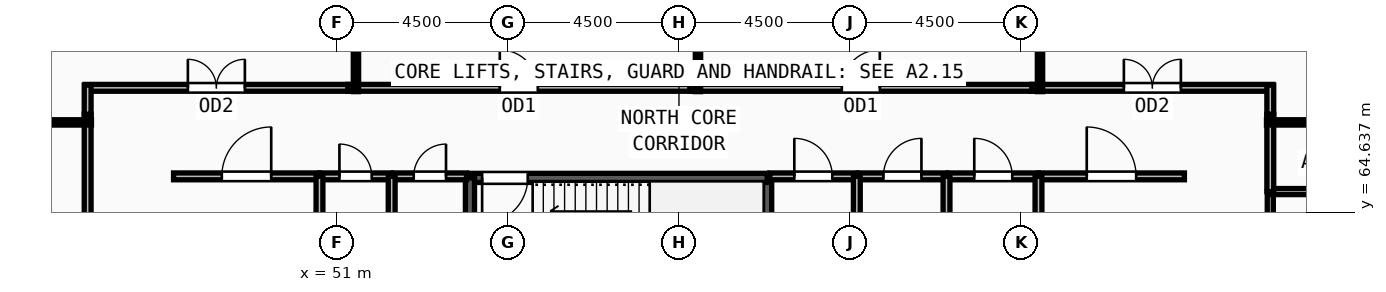
"""IFC4 building model, lengths in metres.
Left out: names, types, materials, properties, quantities, classifications, styles, units other than length and angle.
Written with IfcOpenShell. Run it as: python <this file> out.ifc"""

import sys

from ifc_helpers import new_model, si_unit, direction, frame, frame_2d, origin, place, context, subcontext, project, spatial, rectangle, extrude, source, transform, mapped, element, fill, save


model = new_model("IFC4")
c1 = context("Model", 3, precision=1e-05, world=origin(), true_north=direction((0.0, 1.0)))
c2 = subcontext(c1, "Body", "Model", "MODEL_VIEW")
j1 = project(units=[si_unit("LENGTHUNIT", "METRE"), si_unit("PLANEANGLEUNIT", "RADIAN")], contexts=[c1])
p1 = place(None, origin())
s1 = spatial("IfcSite", under=j1, at=p1, CompositionType="ELEMENT")
p2 = place(p1, origin())
s2 = spatial("IfcBuilding", under=s1, at=p2, CompositionType="ELEMENT")
p3 = place(p2, frame((0.0, 0.0, 124.5)))
s3 = spatial("IfcBuildingStorey", under=s2, at=p3, CompositionType="ELEMENT", Elevation=124.5)
p4 = place(p3, frame((62.32, 62.1, 0.0), z_axis=(0.0, 0.0, 1.0), x_axis=(0.0, 1.0, 0.0)))
e1 = element("IfcWall", 1, at=p4, inside=s3, PredefinedType="SOLIDWALL", context=c2, shape_type="SweptSolid", body=[
    extrude(rectangle(XDim=3.44, YDim=0.24, at=frame_2d((1.72, 0.0))), origin(), (0.0, 0.0, 1.0), 3.57),
])
p5 = place(p3, frame((62.32, 65.54, 0.0), z_axis=(0.0, 0.0, 1.0), x_axis=(-1.0, 0.0, 0.0)))
e2 = element("IfcWall", 2, at=p5, inside=s3, PredefinedType="SOLIDWALL", context=c2, shape_type="SweptSolid", body=[
    extrude(rectangle(XDim=7.82, YDim=0.24, at=frame_2d((3.91, 0.0))), origin(), (0.0, 0.0, 1.0), 3.57),
])
m1 = source(origin(), c2, "Body", "SweptSolid", [
    extrude(rectangle(XDim=1.2, YDim=2.2, at=frame_2d((0.6, 1.1))), frame((0.0, 0.13, 0.0), z_axis=(0.0, -1.0, 0.0), x_axis=(1.0, 0.0, 0.0)), (0.0, 0.0, 1.0), 0.26),
])
p6 = place(p5, frame((6.3, 0.0, 0.0)))
e3 = element("IfcOpeningElement", 3, at=p6, cuts=e2, PredefinedType="OPENING", context=c2, shape_type="MappedRepresentation", body=[
    mapped(m1, transform((0.0, 0.0, 0.0), x_axis=(1.0, 0.0, 0.0), y_axis=(0.0, 1.0, 0.0), z_axis=(0.0, 0.0, 1.0), scale=1.0)),
])
p7 = place(p3, frame((54.5, 65.54, 0.0), z_axis=(0.0, 0.0, 1.0), x_axis=(0.0, -1.0, 0.0)))
e4 = element("IfcWall", 4, at=p7, inside=s3, PredefinedType="SOLIDWALL", context=c2, shape_type="SweptSolid", body=[
    extrude(rectangle(XDim=3.44, YDim=0.24, at=frame_2d((1.72, 0.0))), origin(), (0.0, 0.0, 1.0), 3.57),
])
p8 = place(p3, frame((75.56, 62.44, 0.0), z_axis=(0.0, 0.0, 1.0), x_axis=(0.0, 1.0, 0.0)))
e5 = element("IfcWall", 5, at=p8, inside=s3, PredefinedType="PARTITIONING", context=c2, shape_type="SweptSolid", body=[
    extrude(rectangle(XDim=2.74, YDim=0.16, at=frame_2d((1.37, 0.0))), origin(), (0.0, 0.0, 1.0), 3.57),
])
m2 = source(origin(), c2, "Body", "SweptSolid", [
    extrude(rectangle(XDim=1.05, YDim=2.15, at=frame_2d((0.525, 1.075))), frame((0.0, 0.09, 0.0), z_axis=(0.0, -1.0, 0.0), x_axis=(1.0, 0.0, 0.0)), (0.0, 0.0, 1.0), 0.18),
])
p9 = place(p8, frame((0.845, 0.0, 0.0)))
e6 = element("IfcOpeningElement", 6, at=p9, cuts=e5, PredefinedType="OPENING", context=c2, shape_type="MappedRepresentation", body=[
    mapped(m2, transform((0.0, 0.0, 0.0), x_axis=(1.0, 0.0, 0.0), y_axis=(0.0, 1.0, 0.0), z_axis=(0.0, 0.0, 1.0), scale=1.0)),
])
p10 = place(p3, frame((50.54, 65.58, 0.0), z_axis=(0.0, 0.0, 1.0), x_axis=(1.0, 0.0, 0.0)))
e7 = element("IfcWall", 7, at=p10, inside=s3, PredefinedType="PARTITIONING", context=c2, shape_type="SweptSolid", body=[
    extrude(rectangle(XDim=1.9, YDim=0.18, at=frame_2d((0.95, 0.0))), origin(), (0.0, 0.0, 1.0), 3.57),
])
m3 = source(origin(), c2, "Body", "SweptSolid", [
    extrude(rectangle(XDim=0.85, YDim=2.1, at=frame_2d((0.425, 1.05))), frame((0.0, 0.1, 0.0), z_axis=(0.0, -1.0, 0.0), x_axis=(1.0, 0.0, 0.0)), (0.0, 0.0, 1.0), 0.2),
])
p11 = place(p10, frame((0.525, 0.0, 0.0)))
e8 = element("IfcOpeningElement", 8, at=p11, cuts=e7, PredefinedType="OPENING", context=c2, shape_type="MappedRepresentation", body=[
    mapped(m3, transform((0.0, 0.0, 0.0), x_axis=(1.0, 0.0, 0.0), y_axis=(0.0, 1.0, 0.0), z_axis=(0.0, 0.0, 1.0), scale=1.0)),
])
p12 = place(p3, frame((52.48, 65.58, 0.0), z_axis=(0.0, 0.0, 1.0), x_axis=(1.0, 0.0, 0.0)))
e9 = element("IfcWall", 9, at=p12, inside=s3, PredefinedType="PARTITIONING", context=c2, shape_type="SweptSolid", body=[
    extrude(rectangle(XDim=1.93, YDim=0.18, at=frame_2d((0.965, 0.0))), origin(), (0.0, 0.0, 1.0), 3.57),
])
p13 = place(p12, frame((0.54, 0.0, 0.0)))
e10 = element("IfcOpeningElement", 10, at=p13, cuts=e9, PredefinedType="OPENING", context=c2, shape_type="MappedRepresentation", body=[
    mapped(m3, transform((0.0, 0.0, 0.0), x_axis=(1.0, 0.0, 0.0), y_axis=(0.0, 1.0, 0.0), z_axis=(0.0, 0.0, 1.0), scale=1.0)),
])
p14 = place(p3, frame((62.39, 65.58, 0.0), z_axis=(0.0, 0.0, 1.0), x_axis=(1.0, 0.0, 0.0)))
e11 = element("IfcWall", 11, at=p14, inside=s3, PredefinedType="PARTITIONING", context=c2, shape_type="SweptSolid", body=[
    extrude(rectangle(XDim=2.29, YDim=0.18, at=frame_2d((1.145, 0.0))), origin(), (0.0, 0.0, 1.0), 3.57),
])
m4 = source(origin(), c2, "Body", "SweptSolid", [
    extrude(rectangle(XDim=1.0, YDim=2.2, at=frame_2d((0.5, 1.1))), frame((0.0, 0.1, 0.0), z_axis=(0.0, -1.0, 0.0), x_axis=(1.0, 0.0, 0.0)), (0.0, 0.0, 1.0), 0.2),
])
p15 = place(p14, frame((0.645, 0.0, 0.0)))
e12 = element("IfcOpeningElement", 12, at=p15, cuts=e11, PredefinedType="OPENING", context=c2, shape_type="MappedRepresentation", body=[
    mapped(m4, transform((0.0, 0.0, 0.0), x_axis=(1.0, 0.0, 0.0), y_axis=(0.0, 1.0, 0.0), z_axis=(0.0, 0.0, 1.0), scale=1.0)),
])
p16 = place(p3, frame((64.72, 65.58, 0.0), z_axis=(0.0, 0.0, 1.0), x_axis=(1.0, 0.0, 0.0)))
e13 = element("IfcWall", 13, at=p16, inside=s3, PredefinedType="PARTITIONING", context=c2, shape_type="SweptSolid", body=[
    extrude(rectangle(XDim=2.32, YDim=0.18, at=frame_2d((1.16, 0.0))), origin(), (0.0, 0.0, 1.0), 3.57),
])
p17 = place(p16, frame((0.66, 0.0, 0.0)))
e14 = element("IfcOpeningElement", 14, at=p17, cuts=e13, PredefinedType="OPENING", context=c2, shape_type="MappedRepresentation", body=[
    mapped(m4, transform((0.0, 0.0, 0.0), x_axis=(1.0, 0.0, 0.0), y_axis=(0.0, 1.0, 0.0), z_axis=(0.0, 0.0, 1.0), scale=1.0)),
])
p18 = place(p3, frame((67.08, 65.58, 0.0), z_axis=(0.0, 0.0, 1.0), x_axis=(1.0, 0.0, 0.0)))
e15 = element("IfcWall", 15, at=p18, inside=s3, PredefinedType="PARTITIONING", context=c2, shape_type="SweptSolid", body=[
    extrude(rectangle(XDim=2.38, YDim=0.18, at=frame_2d((1.19, 0.0))), origin(), (0.0, 0.0, 1.0), 3.57),
])
p19 = place(p18, frame((0.69, 0.0, 0.0)))
e16 = element("IfcOpeningElement", 16, at=p19, cuts=e15, PredefinedType="OPENING", context=c2, shape_type="MappedRepresentation", body=[
    mapped(m4, transform((0.0, 0.0, 0.0), x_axis=(1.0, 0.0, 0.0), y_axis=(0.0, 1.0, 0.0), z_axis=(0.0, 0.0, 1.0), scale=1.0)),
])
p20 = place(p3, frame((46.7, 65.58, 0.0), z_axis=(0.0, 0.0, 1.0), x_axis=(1.0, 0.0, 0.0)))
e17 = element("IfcWall", 17, at=p20, inside=s3, PredefinedType="PARTITIONING", context=c2, shape_type="SweptSolid", body=[
    extrude(rectangle(XDim=3.84, YDim=0.18, at=frame_2d((1.92, 0.0))), origin(), (0.0, 0.0, 1.0), 3.57),
])
m5 = source(origin(), c2, "Body", "SweptSolid", [
    extrude(rectangle(XDim=1.3, YDim=2.2, at=frame_2d((0.65, 1.1))), frame((0.0, 0.1, 0.0), z_axis=(0.0, -1.0, 0.0), x_axis=(1.0, 0.0, 0.0)), (0.0, 0.0, 1.0), 0.2),
])
p21 = place(p20, frame((1.27, 0.0, 0.0)))
e18 = element("IfcOpeningElement", 18, at=p21, cuts=e17, PredefinedType="OPENING", context=c2, shape_type="MappedRepresentation", body=[
    mapped(m5, transform((0.0, 0.0, 0.0), x_axis=(1.0, 0.0, 0.0), y_axis=(0.0, 1.0, 0.0), z_axis=(0.0, 0.0, 1.0), scale=1.0)),
])
p22 = place(p3, frame((69.46, 65.58, 0.0), z_axis=(0.0, 0.0, 1.0), x_axis=(1.0, 0.0, 0.0)))
e19 = element("IfcWall", 19, at=p22, inside=s3, PredefinedType="PARTITIONING", context=c2, shape_type="SweptSolid", body=[
    extrude(rectangle(XDim=3.84, YDim=0.18, at=frame_2d((1.92, 0.0))), origin(), (0.0, 0.0, 1.0), 3.57),
])
p23 = place(p22, frame((1.27, 0.0, 0.0)))
e20 = element("IfcOpeningElement", 20, at=p23, cuts=e19, PredefinedType="OPENING", context=c2, shape_type="MappedRepresentation", body=[
    mapped(m5, transform((0.0, 0.0, 0.0), x_axis=(1.0, 0.0, 0.0), y_axis=(0.0, 1.0, 0.0), z_axis=(0.0, 0.0, 1.0), scale=1.0)),
])
p24 = place(p3, frame((69.285, 67.91, 0.0), z_axis=(0.0, 0.0, 1.0), x_axis=(1.0, 0.0, 0.0)))
e21 = element("IfcWall", 21, at=p24, inside=s3, PredefinedType="PARTITIONING", context=c2, shape_type="SweptSolid", body=[
    extrude(rectangle(XDim=6.345, YDim=0.18, at=frame_2d((3.172, 0.0))), origin(), (0.0, 0.0, 1.0), 3.57),
])
m6 = source(origin(), c2, "Body", "SweptSolid", [
    extrude(rectangle(XDim=1.5, YDim=2.2, at=frame_2d((0.75, 1.1))), frame((0.0, 0.1, 0.0), z_axis=(0.0, -1.0, 0.0), x_axis=(1.0, 0.0, 0.0)), (0.0, 0.0, 1.0), 0.2),
])
p25 = place(p24, frame((2.422, 0.0, 0.0)))
e22 = element("IfcOpeningElement", 22, at=p25, cuts=e21, PredefinedType="OPENING", context=c2, shape_type="MappedRepresentation", body=[
    mapped(m6, transform((0.0, 0.0, 0.0), x_axis=(1.0, 0.0, 0.0), y_axis=(0.0, 1.0, 0.0), z_axis=(0.0, 0.0, 1.0), scale=1.0)),
])
p26 = place(p3, frame((60.285, 67.91, 0.0), z_axis=(0.0, 0.0, 1.0), x_axis=(1.0, 0.0, 0.0)))
e23 = element("IfcWall", 23, at=p26, inside=s3, PredefinedType="PARTITIONING", context=c2, shape_type="SweptSolid", body=[
    extrude(rectangle(XDim=9.0, YDim=0.18, at=frame_2d((4.5, 0.0))), origin(), (0.0, 0.0, 1.0), 3.57),
])
p27 = place(p26, frame((4.0, 0.0, 0.0)))
e24 = element("IfcOpeningElement", 24, at=p27, cuts=e23, PredefinedType="OPENING", context=c2, shape_type="MappedRepresentation", body=[
    mapped(m4, transform((0.0, 0.0, 0.0), x_axis=(1.0, 0.0, 0.0), y_axis=(0.0, 1.0, 0.0), z_axis=(0.0, 0.0, 1.0), scale=1.0)),
])
p28 = place(p3, frame((51.285, 67.91, 0.0), z_axis=(0.0, 0.0, 1.0), x_axis=(1.0, 0.0, 0.0)))
e25 = element("IfcWall", 25, at=p28, inside=s3, PredefinedType="PARTITIONING", context=c2, shape_type="SweptSolid", body=[
    extrude(rectangle(XDim=9.0, YDim=0.18, at=frame_2d((4.5, 0.0))), origin(), (0.0, 0.0, 1.0), 3.57),
])
p29 = place(p28, frame((4.0, 0.0, 0.0)))
e26 = element("IfcOpeningElement", 26, at=p29, cuts=e25, PredefinedType="OPENING", context=c2, shape_type="MappedRepresentation", body=[
    mapped(m4, transform((0.0, 0.0, 0.0), x_axis=(1.0, 0.0, 0.0), y_axis=(0.0, 1.0, 0.0), z_axis=(0.0, 0.0, 1.0), scale=1.0)),
])
p30 = place(p3, frame((44.37, 67.91, 0.0), z_axis=(0.0, 0.0, 1.0), x_axis=(1.0, 0.0, 0.0)))
e27 = element("IfcWall", 27, at=p30, inside=s3, PredefinedType="PARTITIONING", context=c2, shape_type="SweptSolid", body=[
    extrude(rectangle(XDim=6.915, YDim=0.18, at=frame_2d((3.458, 0.0))), origin(), (0.0, 0.0, 1.0), 3.57),
])
p31 = place(p30, frame((2.707, 0.0, 0.0)))
e28 = element("IfcOpeningElement", 28, at=p31, cuts=e27, PredefinedType="OPENING", context=c2, shape_type="MappedRepresentation", body=[
    mapped(m6, transform((0.0, 0.0, 0.0), x_axis=(1.0, 0.0, 0.0), y_axis=(0.0, 1.0, 0.0), z_axis=(0.0, 0.0, 1.0), scale=1.0)),
])
p32 = place(p3, frame((44.44, 58.285, 0.0), z_axis=(0.0, 0.0, 1.0), x_axis=(0.0, 1.0, 0.0)))
e29 = element("IfcWall", 29, at=p32, inside=s3, PredefinedType="PARTITIONING", context=c2, shape_type="SweptSolid", body=[
    extrude(rectangle(XDim=8.93, YDim=0.18, at=frame_2d((4.465, 0.0))), origin(), (0.0, 0.0, 1.0), 3.57),
])
p33 = place(p32, frame((3.715, 0.0, 0.0)))
e30 = element("IfcOpeningElement", 30, at=p33, cuts=e29, PredefinedType="OPENING", context=c2, shape_type="MappedRepresentation", body=[
    mapped(m6, transform((0.0, 0.0, 0.0), x_axis=(1.0, 0.0, 0.0), y_axis=(0.0, 1.0, 0.0), z_axis=(0.0, 0.0, 1.0), scale=1.0)),
])
p34 = place(p3, frame((75.56, 65.18, 0.0), z_axis=(0.0, 0.0, 1.0), x_axis=(1.0, 0.0, 0.0)))
e31 = element("IfcWall", 31, at=p34, inside=s3, PredefinedType="PARTITIONING", context=c2, shape_type="SweptSolid", body=[
    extrude(rectangle(XDim=4.46, YDim=0.16, at=frame_2d((2.23, 0.0))), origin(), (0.0, 0.0, 1.0), 3.57),
])
p35 = place(p3, frame((50.54, 61.95, 0.0), z_axis=(0.0, 0.0, 1.0), x_axis=(0.0, 1.0, 0.0)))
e32 = element("IfcWall", 32, at=p35, inside=s3, PredefinedType="PARTITIONING", context=c2, shape_type="SweptSolid", body=[
    extrude(rectangle(XDim=3.63, YDim=0.18, at=frame_2d((1.815, 0.0))), origin(), (0.0, 0.0, 1.0), 3.57),
])
for number, where, z_axis, x_axis in (
    (33, (52.44, 61.875, 0.0), (0.0, 0.0, 1.0), (0.0, 1.0, 0.0)),
    (34, (64.68, 61.875, 0.0), (0.0, 0.0, 1.0), (0.0, 1.0, 0.0)),
    (35, (67.04, 61.875, 0.0), (0.0, 0.0, 1.0), (0.0, 1.0, 0.0)),
):
    element("IfcWall", number, at=place(p3, frame(where, z_axis=z_axis, x_axis=x_axis)), inside=s3, PredefinedType="PARTITIONING", context=c2, shape_type="SweptSolid", body=[
        extrude(rectangle(XDim=3.705, YDim=0.18, at=frame_2d((1.853, 0.0))), origin(), (0.0, 0.0, 1.0), 3.57),
    ])
p36 = place(p3, frame((69.46, 61.95, 0.0), z_axis=(0.0, 0.0, 1.0), x_axis=(0.0, 1.0, 0.0)))
e36 = element("IfcWall", 36, at=p36, inside=s3, PredefinedType="PARTITIONING", context=c2, shape_type="SweptSolid", body=[
    extrude(rectangle(XDim=3.63, YDim=0.18, at=frame_2d((1.815, 0.0))), origin(), (0.0, 0.0, 1.0), 3.57),
])
p37 = place(p3, frame((75.56, 67.215, 0.0), z_axis=(0.0, 0.0, 1.0), x_axis=(0.0, -1.0, 0.0)))
e37 = element("IfcWall", 37, at=p37, inside=s3, PredefinedType="PARTITIONING", context=c2, shape_type="SweptSolid", body=[
    extrude(rectangle(XDim=2.035, YDim=0.18, at=frame_2d((1.018, 0.0))), origin(), (0.0, 0.0, 1.0), 3.57),
])
for number, where, z_axis, x_axis in (
    (38, (75.56, 67.98, 0.0), (0.0, 0.0, 1.0), (0.0, -1.0, 0.0)),
    (39, (44.44, 67.215, 0.0), (0.0, 0.0, 1.0), (0.0, 1.0, 0.0)),
):
    element("IfcWall", number, at=place(p3, frame(where, z_axis=z_axis, x_axis=x_axis)), inside=s3, PredefinedType="PARTITIONING", context=c2, shape_type="SweptSolid", body=[
        extrude(rectangle(XDim=0.765, YDim=0.18, at=frame_2d((0.382, 0.0))), origin(), (0.0, 0.0, 1.0), 3.57),
    ])
p38 = place(p3, frame((44.54, 67.0, 0.0), z_axis=(0.0, 0.0, 1.0), x_axis=(-1.0, 0.0, 0.0)))
e40 = element("IfcWall", 40, at=p38, inside=s3, PredefinedType="PARTITIONING", context=c2, shape_type="SweptSolid", body=[
    extrude(rectangle(XDim=20.878, YDim=0.14, at=frame_2d((10.439, 0.0))), origin(), (0.0, 0.0, 1.0), 2.755),
])
p39 = place(p3, frame((75.46, 67.0, 0.0), z_axis=(0.0, 0.0, 1.0), x_axis=(1.0, 0.0, 0.0)))
e41 = element("IfcWall", 41, at=p39, inside=s3, PredefinedType="PARTITIONING", context=c2, shape_type="SweptSolid", body=[
    extrude(rectangle(XDim=20.897, YDim=0.14, at=frame_2d((10.448, 0.0))), origin(), (0.0, 0.0, 1.0), 2.755),
])
p40 = place(p3, frame((51.5, 67.81, 0.0), z_axis=(0.0, 0.0, 1.0), x_axis=(0.0, 1.0, 0.0)))
e42 = element("IfcWall", 42, at=p40, inside=s3, PredefinedType="PARTITIONING", context=c2, shape_type="SweptSolid", body=[
    extrude(rectangle(XDim=12.646, YDim=0.14, at=frame_2d((6.323, 0.0))), origin(), (0.0, 0.0, 1.0), 3.57),
])
p41 = place(p3, frame((60.5, 67.81, 0.0), z_axis=(0.0, 0.0, 1.0), x_axis=(0.0, 1.0, 0.0)))
e43 = element("IfcWall", 43, at=p41, inside=s3, PredefinedType="PARTITIONING", context=c2, shape_type="SweptSolid", body=[
    extrude(rectangle(XDim=12.855, YDim=0.14, at=frame_2d((6.427, 0.0))), origin(), (0.0, 0.0, 1.0), 3.57),
])
p42 = place(p3, frame((69.5, 67.81, 0.0), z_axis=(0.0, 0.0, 1.0), x_axis=(0.0, 1.0, 0.0)))
e44 = element("IfcWall", 44, at=p42, inside=s3, PredefinedType="PARTITIONING", context=c2, shape_type="SweptSolid", body=[
    extrude(rectangle(XDim=12.328, YDim=0.14, at=frame_2d((6.164, 0.0))), origin(), (0.0, 0.0, 1.0), 3.57),
])
m7 = source(origin(), c2, "Body", "SweptSolid", [
    extrude(rectangle(XDim=1.2, YDim=2.2, at=frame_2d((0.6, 1.1))), frame((0.0, 0.025, 0.0), z_axis=(0.0, -1.0, 0.0), x_axis=(1.0, 0.0, 0.0)), (0.0, 0.0, 1.0), 0.05),
])
p43 = place(p6, origin())
e45 = element("IfcDoor", 45, at=p43, inside=s3, OperationType="SINGLE_SWING_RIGHT", PredefinedType="DOOR", context=c2, shape_type="MappedRepresentation", body=[
    mapped(m7, transform((0.0, 0.0, 0.0), x_axis=(1.0, 0.0, 0.0), y_axis=(0.0, 1.0, 0.0), z_axis=(0.0, 0.0, 1.0), scale=1.0)),
])
fill(e3, e45)
m8 = source(origin(), c2, "Body", "SweptSolid", [
    extrude(rectangle(XDim=0.85, YDim=2.1, at=frame_2d((0.425, 1.05))), frame((0.0, 0.025, 0.0), z_axis=(0.0, -1.0, 0.0), x_axis=(1.0, 0.0, 0.0)), (0.0, 0.0, 1.0), 0.05),
])
p44 = place(p11, origin())
e46 = element("IfcDoor", 46, at=p44, inside=s3, OperationType="SINGLE_SWING_LEFT", PredefinedType="DOOR", context=c2, shape_type="MappedRepresentation", body=[
    mapped(m8, transform((0.0, 0.0, 0.0), x_axis=(1.0, 0.0, 0.0), y_axis=(0.0, 1.0, 0.0), z_axis=(0.0, 0.0, 1.0), scale=1.0)),
])
fill(e8, e46)
p45 = place(p13, origin())
e47 = element("IfcDoor", 47, at=p45, inside=s3, OperationType="SINGLE_SWING_RIGHT", PredefinedType="DOOR", context=c2, shape_type="MappedRepresentation", body=[
    mapped(m8, transform((0.0, 0.0, 0.0), x_axis=(1.0, 0.0, 0.0), y_axis=(0.0, 1.0, 0.0), z_axis=(0.0, 0.0, 1.0), scale=1.0)),
])
fill(e10, e47)
m9 = source(origin(), c2, "Body", "SweptSolid", [
    extrude(rectangle(XDim=1.0, YDim=2.2, at=frame_2d((0.5, 1.1))), frame((0.0, 0.025, 0.0), z_axis=(0.0, -1.0, 0.0), x_axis=(1.0, 0.0, 0.0)), (0.0, 0.0, 1.0), 0.05),
])
p46 = place(p15, origin())
e48 = element("IfcDoor", 48, at=p46, inside=s3, OperationType="SINGLE_SWING_LEFT", PredefinedType="DOOR", context=c2, shape_type="MappedRepresentation", body=[
    mapped(m9, transform((0.0, 0.0, 0.0), x_axis=(1.0, 0.0, 0.0), y_axis=(0.0, 1.0, 0.0), z_axis=(0.0, 0.0, 1.0), scale=1.0)),
])
fill(e12, e48)
p47 = place(p17, origin())
e49 = element("IfcDoor", 49, at=p47, inside=s3, OperationType="SINGLE_SWING_RIGHT", PredefinedType="DOOR", context=c2, shape_type="MappedRepresentation", body=[
    mapped(m9, transform((0.0, 0.0, 0.0), x_axis=(1.0, 0.0, 0.0), y_axis=(0.0, 1.0, 0.0), z_axis=(0.0, 0.0, 1.0), scale=1.0)),
])
fill(e14, e49)
p48 = place(p19, origin())
e50 = element("IfcDoor", 50, at=p48, inside=s3, OperationType="SINGLE_SWING_LEFT", PredefinedType="DOOR", context=c2, shape_type="MappedRepresentation", body=[
    mapped(m9, transform((0.0, 0.0, 0.0), x_axis=(1.0, 0.0, 0.0), y_axis=(0.0, 1.0, 0.0), z_axis=(0.0, 0.0, 1.0), scale=1.0)),
])
fill(e16, e50)
m10 = source(origin(), c2, "Body", "SweptSolid", [
    extrude(rectangle(XDim=1.3, YDim=2.2, at=frame_2d((0.65, 1.1))), frame((0.0, 0.025, 0.0), z_axis=(0.0, -1.0, 0.0), x_axis=(1.0, 0.0, 0.0)), (0.0, 0.0, 1.0), 0.05),
])
p49 = place(p21, origin())
e51 = element("IfcDoor", 51, at=p49, inside=s3, OperationType="SINGLE_SWING_RIGHT", PredefinedType="DOOR", context=c2, shape_type="MappedRepresentation", body=[
    mapped(m10, transform((0.0, 0.0, 0.0), x_axis=(1.0, 0.0, 0.0), y_axis=(0.0, 1.0, 0.0), z_axis=(0.0, 0.0, 1.0), scale=1.0)),
])
fill(e18, e51)
p50 = place(p23, origin())
e52 = element("IfcDoor", 52, at=p50, inside=s3, OperationType="SINGLE_SWING_LEFT", PredefinedType="DOOR", context=c2, shape_type="MappedRepresentation", body=[
    mapped(m10, transform((0.0, 0.0, 0.0), x_axis=(1.0, 0.0, 0.0), y_axis=(0.0, 1.0, 0.0), z_axis=(0.0, 0.0, 1.0), scale=1.0)),
])
fill(e20, e52)
m11 = source(origin(), c2, "Body", "SweptSolid", [
    extrude(rectangle(XDim=1.5, YDim=2.2, at=frame_2d((0.75, 1.1))), frame((0.0, 0.025, 0.0), z_axis=(0.0, -1.0, 0.0), x_axis=(1.0, 0.0, 0.0)), (0.0, 0.0, 1.0), 0.05),
])
p51 = place(p25, origin())
e53 = element("IfcDoor", 53, at=p51, inside=s3, OperationType="DOUBLE_DOOR_SINGLE_SWING", PredefinedType="DOOR", context=c2, shape_type="MappedRepresentation", body=[
    mapped(m11, transform((0.0, 0.0, 0.0), x_axis=(1.0, 0.0, 0.0), y_axis=(0.0, 1.0, 0.0), z_axis=(0.0, 0.0, 1.0), scale=1.0)),
])
fill(e22, e53)
p52 = place(p27, origin())
e54 = element("IfcDoor", 54, at=p52, inside=s3, OperationType="SINGLE_SWING_RIGHT", PredefinedType="DOOR", context=c2, shape_type="MappedRepresentation", body=[
    mapped(m9, transform((0.0, 0.0, 0.0), x_axis=(1.0, 0.0, 0.0), y_axis=(0.0, 1.0, 0.0), z_axis=(0.0, 0.0, 1.0), scale=1.0)),
])
fill(e24, e54)
p53 = place(p29, origin())
e55 = element("IfcDoor", 55, at=p53, inside=s3, OperationType="SINGLE_SWING_LEFT", PredefinedType="DOOR", context=c2, shape_type="MappedRepresentation", body=[
    mapped(m9, transform((0.0, 0.0, 0.0), x_axis=(1.0, 0.0, 0.0), y_axis=(0.0, 1.0, 0.0), z_axis=(0.0, 0.0, 1.0), scale=1.0)),
])
fill(e26, e55)
p54 = place(p31, origin())
e56 = element("IfcDoor", 56, at=p54, inside=s3, OperationType="DOUBLE_DOOR_SINGLE_SWING", PredefinedType="DOOR", context=c2, shape_type="MappedRepresentation", body=[
    mapped(m11, transform((0.0, 0.0, 0.0), x_axis=(1.0, 0.0, 0.0), y_axis=(0.0, 1.0, 0.0), z_axis=(0.0, 0.0, 1.0), scale=1.0)),
])
fill(e28, e56)
save(model, sys.argv[1])
